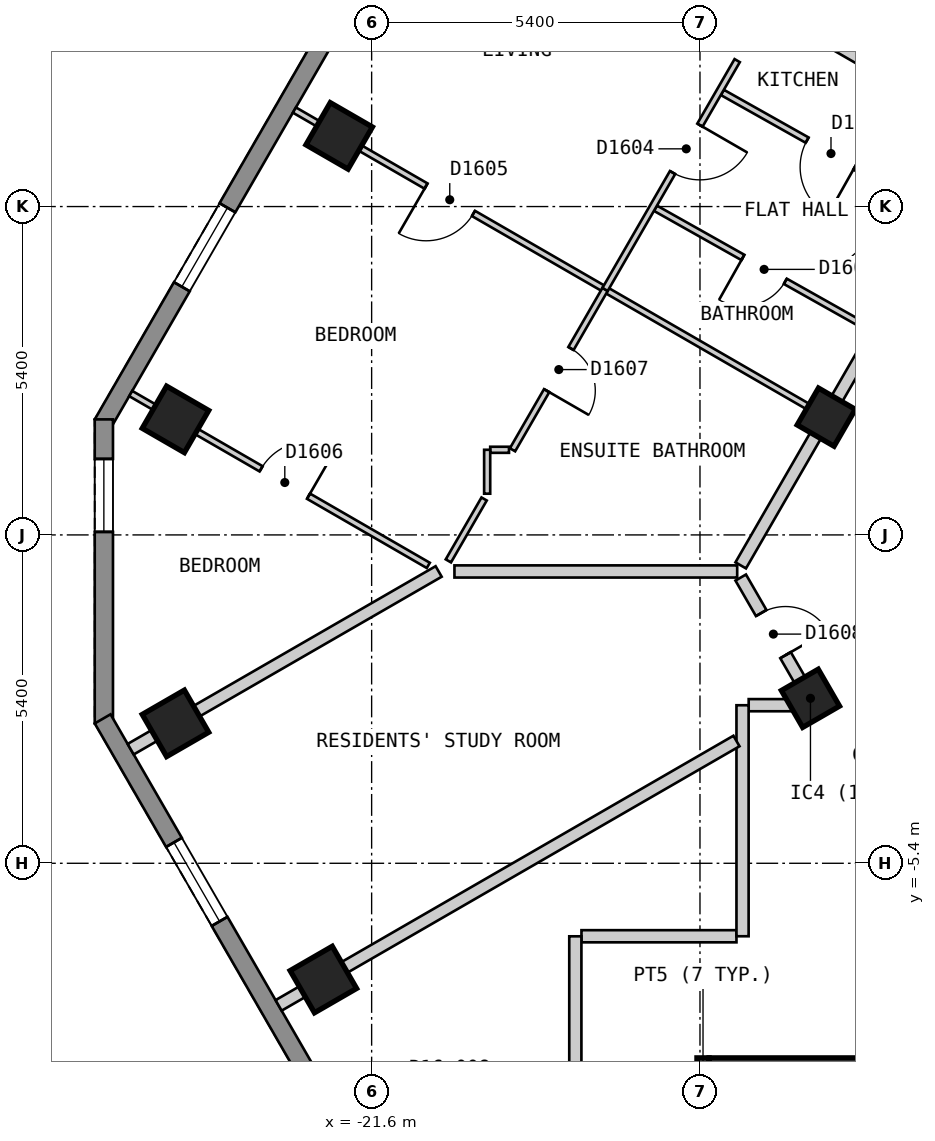
"""IFC4 building model, lengths in metres.
Left out: names, types, materials, properties, quantities, classifications, styles, units other than length and angle.
Written with IfcOpenShell. Run it as: python <this file> out.ifc"""

import sys

from ifc_helpers import new_model, si_unit, direction, frame, frame_2d, origin, origin_2d, place, context, subcontext, project, spatial, polyline, rectangle, outline, extrude, element, fill, save


model = new_model("IFC4")
c1 = context("Model", 3, precision=1e-05, world=origin(), true_north=direction((0.0, 1.0)))
c2 = subcontext(c1, "Body", "Model", "MODEL_VIEW")
j1 = project(units=[si_unit("LENGTHUNIT", "METRE"), si_unit("PLANEANGLEUNIT", "RADIAN")], contexts=[c1])
p1 = place(None, origin())
s1 = spatial("IfcSite", under=j1, at=p1, CompositionType="ELEMENT")
p2 = place(p1, origin())
s2 = spatial("IfcBuilding", under=s1, at=p2, CompositionType="ELEMENT")
p3 = place(p2, frame((0.0, 0.0, 163.2)))
s3 = spatial("IfcBuildingStorey", under=s2, at=p3, CompositionType="ELEMENT", Elevation=163.2)
for number, where, z_axis, x_axis in (
    (1, (-22.134, 6.562, 0.0), (0.0, 0.0, 1.0), (-0.5, -0.866, 0.0)),
    (2, (-24.826, 1.9, 0.0), (0.0, 0.0, 1.0), (-0.5, -0.866, 0.0)),
    (3, (-24.826, -3.099, 0.0), (0.0, 0.0, 1.0), (0.5, -0.866, 0.0)),
    (4, (-22.394, -7.312, 0.0), (0.0, 0.0, 1.0), (0.5, -0.866, 0.0)),
):
    element("IfcColumn", number, at=place(p3, frame(where, z_axis=z_axis, x_axis=x_axis)), inside=s3, PredefinedType="COLUMN", context=c2, shape_type="SweptSolid", body=[
        extrude(rectangle(XDim=0.8, YDim=0.8, at=origin_2d()), origin(), (0.0, 0.0, 1.0), 3.0),
    ])
for number, where, z_axis, x_axis in (
    (5, (-14.383, -2.687, 0.0), (0.0, 0.0, 1.0), (0.5, -0.866, 0.0)),
    (6, (-14.123, 1.937, 0.0), (0.0, 0.0, 1.0), (-0.5, -0.866, 0.0)),
):
    element("IfcColumn", number, at=place(p3, frame(where, z_axis=z_axis, x_axis=x_axis)), inside=s3, PredefinedType="COLUMN", context=c2, shape_type="SweptSolid", body=[
        extrude(rectangle(XDim=0.7, YDim=0.7, at=origin_2d()), origin(), (0.0, 0.0, 1.0), 3.0),
    ])
p4 = place(p3, frame((-14.592, 21.625, 0.0), z_axis=(0.0, 0.0, 1.0), x_axis=(-0.500010537973, -0.866019319597, 0.0)))
e7 = element("IfcWall", 7, at=p4, inside=s3, PredefinedType="SOLIDWALL", context=c2, shape_type="SweptSolid", body=[
    extrude(outline(polyline([(0.0, -0.15), (22.863, -0.15), (22.783, 0.15), (0.08, 0.15), (0.0, -0.15)])), origin(), (0.0, 0.0, 1.0), 2.7),
])
p5 = place(p4, frame((2.606, 0.0, 0.15)))
e8 = element("IfcOpeningElement", 8, at=p5, cuts=e7, PredefinedType="OPENING", context=c2, shape_type="SweptSolid", body=[
    extrude(rectangle(XDim=1.5, YDim=2.1, at=frame_2d((0.75, 1.05))), frame((0.0, 0.16, 0.0), z_axis=(0.0, -1.0, 0.0), x_axis=(1.0, 0.0, 0.0)), (0.0, 0.0, 1.0), 0.32),
])
p6 = place(p4, frame((7.99, 0.0, 0.15)))
e9 = element("IfcOpeningElement", 9, at=p6, cuts=e7, PredefinedType="OPENING", context=c2, shape_type="SweptSolid", body=[
    extrude(rectangle(XDim=1.5, YDim=2.1, at=frame_2d((0.75, 1.05))), frame((0.0, 0.16, 0.0), z_axis=(0.0, -1.0, 0.0), x_axis=(1.0, 0.0, 0.0)), (0.0, 0.0, 1.0), 0.32),
])
p7 = place(p4, frame((13.373, 0.0, 0.15)))
e10 = element("IfcOpeningElement", 10, at=p7, cuts=e7, PredefinedType="OPENING", context=c2, shape_type="SweptSolid", body=[
    extrude(rectangle(XDim=1.5, YDim=2.1, at=frame_2d((0.75, 1.05))), frame((0.0, 0.16, 0.0), z_axis=(0.0, -1.0, 0.0), x_axis=(1.0, 0.0, 0.0)), (0.0, 0.0, 1.0), 0.32),
])
p8 = place(p4, frame((18.758, 0.0, 0.15)))
e11 = element("IfcOpeningElement", 11, at=p8, cuts=e7, PredefinedType="OPENING", context=c2, shape_type="SweptSolid", body=[
    extrude(rectangle(XDim=1.5, YDim=2.1, at=frame_2d((0.75, 1.05))), frame((0.0, 0.16, 0.0), z_axis=(0.0, -1.0, 0.0), x_axis=(1.0, 0.0, 0.0)), (0.0, 0.0, 1.0), 0.32),
])
p9 = place(p3, frame((-26.004, 1.9, 0.0), z_axis=(0.0, 0.0, 1.0), x_axis=(0.0, -1.0, 0.0)))
e12 = element("IfcWall", 12, at=p9, inside=s3, PredefinedType="SOLIDWALL", context=c2, shape_type="SweptSolid", body=[
    extrude(outline(polyline([(0.0, -0.15), (5.0, -0.15), (4.92, 0.15), (0.08, 0.15), (0.0, -0.15)])), origin(), (0.0, 0.0, 1.0), 2.7),
])
p10 = place(p9, frame((0.65, 0.0, 0.15)))
e13 = element("IfcOpeningElement", 13, at=p10, cuts=e12, PredefinedType="OPENING", context=c2, shape_type="SweptSolid", body=[
    extrude(rectangle(XDim=1.2, YDim=2.1, at=frame_2d((0.6, 1.05))), frame((0.0, 0.16, 0.0), z_axis=(0.0, -1.0, 0.0), x_axis=(1.0, 0.0, 0.0)), (0.0, 0.0, 1.0), 0.32),
])
p11 = place(p3, frame((-26.024, -3.025, 0.0), z_axis=(0.0, 0.0, 1.0), x_axis=(0.500018670445, -0.86601462413, 0.0)))
e14 = element("IfcWall", 14, at=p11, inside=s3, PredefinedType="SOLIDWALL", context=c2, shape_type="SweptSolid", body=[
    extrude(outline(polyline([(0.0, -0.15), (20.785, -0.15), (20.705, 0.15), (0.08, 0.15), (0.0, -0.15)])), origin(), (0.0, 0.0, 1.0), 2.7),
])
p12 = place(p11, frame((2.346, 0.0, 0.15)))
e15 = element("IfcOpeningElement", 15, at=p12, cuts=e14, PredefinedType="OPENING", context=c2, shape_type="SweptSolid", body=[
    extrude(rectangle(XDim=1.5, YDim=2.1, at=frame_2d((0.75, 1.05))), frame((0.0, 0.16, 0.0), z_axis=(0.0, -1.0, 0.0), x_axis=(1.0, 0.0, 0.0)), (0.0, 0.0, 1.0), 0.32),
])
p13 = place(p11, frame((7.21, 0.0, 0.15)))
e16 = element("IfcOpeningElement", 16, at=p13, cuts=e14, PredefinedType="OPENING", context=c2, shape_type="SweptSolid", body=[
    extrude(rectangle(XDim=1.5, YDim=2.1, at=frame_2d((0.75, 1.05))), frame((0.0, 0.16, 0.0), z_axis=(0.0, -1.0, 0.0), x_axis=(1.0, 0.0, 0.0)), (0.0, 0.0, 1.0), 0.32),
])
p14 = place(p11, frame((12.073, 0.0, 0.15)))
e17 = element("IfcOpeningElement", 17, at=p14, cuts=e14, PredefinedType="OPENING", context=c2, shape_type="SweptSolid", body=[
    extrude(rectangle(XDim=1.5, YDim=2.1, at=frame_2d((0.75, 1.05))), frame((0.0, 0.16, 0.0), z_axis=(0.0, -1.0, 0.0), x_axis=(1.0, 0.0, 0.0)), (0.0, 0.0, 1.0), 0.32),
])
p15 = place(p11, frame((16.938, 0.0, 0.15)))
e18 = element("IfcOpeningElement", 18, at=p15, cuts=e14, PredefinedType="OPENING", context=c2, shape_type="SweptSolid", body=[
    extrude(rectangle(XDim=1.5, YDim=2.1, at=frame_2d((0.75, 1.05))), frame((0.0, 0.16, 0.0), z_axis=(0.0, -1.0, 0.0), x_axis=(1.0, 0.0, 0.0)), (0.0, 0.0, 1.0), 0.32),
])
p16 = place(p3, frame((-15.53, -0.701, 0.0), z_axis=(0.0, 0.0, 1.0), x_axis=(0.499972710878, -0.866041158593, 0.0)))
e19 = element("IfcWall", 19, at=p16, inside=s3, PredefinedType="PARTITIONING", context=c2, shape_type="SweptSolid", body=[
    extrude(rectangle(XDim=2.308, YDim=0.2, at=frame_2d((1.154, 0.0))), origin(), (0.0, 0.0, 1.0), 2.7),
])
p17 = place(p16, frame((0.674, 0.0, 0.0)))
e20 = element("IfcOpeningElement", 20, at=p17, cuts=e19, PredefinedType="OPENING", context=c2, shape_type="SweptSolid", body=[
    extrude(rectangle(XDim=0.8, YDim=2.1, at=frame_2d((0.4, 1.05))), frame((0.0, 0.11, 0.0), z_axis=(0.0, -1.0, 0.0), x_axis=(1.0, 0.0, 0.0)), (0.0, 0.0, 1.0), 0.22),
])
p18 = place(p3, frame((-18.149, -6.6, 0.0), z_axis=(0.0, 0.0, 1.0), x_axis=(1.0, 0.0, 0.0)))
e21 = element("IfcWall", 21, at=p18, inside=s3, PredefinedType="PARTITIONING", context=c2, shape_type="SweptSolid", body=[
    extrude(rectangle(XDim=2.549, YDim=0.2, at=frame_2d((1.274, 0.0))), origin(), (0.0, 0.0, 1.0), 2.7),
])
p19 = place(p3, frame((-15.399, -2.8, 0.0), z_axis=(0.0, 0.0, 1.0), x_axis=(1.0, 0.0, 0.0)))
e22 = element("IfcWall", 22, at=p19, inside=s3, PredefinedType="PARTITIONING", context=c2, shape_type="SweptSolid", body=[
    extrude(rectangle(XDim=1.081, YDim=0.2, at=frame_2d((0.541, 0.0))), origin(), (0.0, 0.0, 1.0), 2.7),
])
p20 = place(p3, frame((-15.53, -0.501, 0.0), z_axis=(0.0, 0.0, 1.0), x_axis=(0.499952498232, 0.866052827206, 0.0)))
e23 = element("IfcWall", 23, at=p20, inside=s3, PredefinedType="PARTITIONING", context=c2, shape_type="SweptSolid", body=[
    extrude(rectangle(XDim=9.585, YDim=0.2, at=frame_2d((4.792, 0.0))), origin(), (0.0, 0.0, 1.0), 2.7),
])
p21 = place(p20, frame((5.031, 0.0, 0.0)))
e24 = element("IfcOpeningElement", 24, at=p21, cuts=e23, PredefinedType="OPENING", context=c2, shape_type="SweptSolid", body=[
    extrude(rectangle(XDim=1.0, YDim=2.1, at=frame_2d((0.5, 1.05))), frame((0.0, 0.11, 0.0), z_axis=(0.0, -1.0, 0.0), x_axis=(1.0, 0.0, 0.0)), (0.0, 0.0, 1.0), 0.22),
])
p22 = place(p3, frame((-15.5, -6.6, 0.0), z_axis=(0.0, 0.0, 1.0), x_axis=(0.0, 1.0, 0.0)))
e25 = element("IfcWall", 25, at=p22, inside=s3, PredefinedType="PARTITIONING", context=c2, shape_type="SweptSolid", body=[
    extrude(rectangle(XDim=3.799, YDim=0.2, at=frame_2d((1.899, 0.0))), origin(), (0.0, 0.0, 1.0), 2.7),
])
p23 = place(p3, frame((-18.25, -16.152, 0.0), z_axis=(0.0, 0.0, 1.0), x_axis=(0.0, 1.0, 0.0)))
e26 = element("IfcWall", 26, at=p23, inside=s3, PredefinedType="PARTITIONING", context=c2, shape_type="SweptSolid", body=[
    extrude(rectangle(XDim=9.551, YDim=0.2, at=frame_2d((4.775, 0.0))), origin(), (0.0, 0.0, 1.0), 2.7),
])
p24 = place(p23, frame((6.026, 0.0, 0.0)))
e27 = element("IfcOpeningElement", 27, at=p24, cuts=e26, PredefinedType="OPENING", context=c2, shape_type="SweptSolid", body=[
    extrude(rectangle(XDim=0.8, YDim=2.1, at=frame_2d((0.4, 1.05))), frame((0.0, 0.11, 0.0), z_axis=(0.0, -1.0, 0.0), x_axis=(1.0, 0.0, 0.0)), (0.0, 0.0, 1.0), 0.22),
])
p25 = place(p3, frame((-16.932, 5.372, 0.0), z_axis=(0.0, 0.0, 1.0), x_axis=(0.871514356952, -0.490369988505, 0.0)))
e28 = element("IfcWall", 28, at=p25, inside=s3, PredefinedType="PARTITIONING", context=c2, shape_type="SweptSolid", body=[
    extrude(rectangle(XDim=4.05, YDim=0.1, at=frame_2d((2.025, 0.0))), origin(), (0.0, 0.0, 1.0), 2.7),
])
p26 = place(p25, frame((1.65, 0.0, 0.0)))
e29 = element("IfcOpeningElement", 29, at=p26, cuts=e28, PredefinedType="OPENING", context=c2, shape_type="SweptSolid", body=[
    extrude(rectangle(XDim=0.8, YDim=2.1, at=frame_2d((0.4, 1.05))), frame((0.0, 0.06, 0.0), z_axis=(0.0, -1.0, 0.0), x_axis=(1.0, 0.0, 0.0)), (0.0, 0.0, 1.0), 0.12),
])
p27 = place(p3, frame((-15.832, 7.277, 0.0), z_axis=(0.0, 0.0, 1.0), x_axis=(0.871528850672, -0.490344228523, 0.0)))
e30 = element("IfcWall", 30, at=p27, inside=s3, PredefinedType="PARTITIONING", context=c2, shape_type="SweptSolid", body=[
    extrude(rectangle(XDim=4.05, YDim=0.1, at=frame_2d((2.025, 0.0))), origin(), (0.0, 0.0, 1.0), 2.7),
])
p28 = place(p27, frame((1.6, 0.0, 0.0)))
e31 = element("IfcOpeningElement", 31, at=p28, cuts=e30, PredefinedType="OPENING", context=c2, shape_type="SweptSolid", body=[
    extrude(rectangle(XDim=0.9, YDim=2.1, at=frame_2d((0.45, 1.05))), frame((0.0, 0.06, 0.0), z_axis=(0.0, -1.0, 0.0), x_axis=(1.0, 0.0, 0.0)), (0.0, 0.0, 1.0), 0.12),
])
p29 = place(p3, frame((-22.87, 6.987, 0.0), z_axis=(0.0, 0.0, 1.0), x_axis=(0.866022959057, -0.500004234368, 0.0)))
e32 = element("IfcWall", 32, at=p29, inside=s3, PredefinedType="PARTITIONING", context=c2, shape_type="SweptSolid", body=[
    extrude(rectangle(XDim=10.0, YDim=0.1, at=frame_2d((5.0, 0.0))), origin(), (0.0, 0.0, 1.0), 2.7),
])
p30 = place(p29, frame((2.5, 0.0, 0.0)))
e33 = element("IfcOpeningElement", 33, at=p30, cuts=e32, PredefinedType="OPENING", context=c2, shape_type="SweptSolid", body=[
    extrude(rectangle(XDim=0.9, YDim=2.1, at=frame_2d((0.45, 1.05))), frame((0.0, 0.06, 0.0), z_axis=(0.0, -1.0, 0.0), x_axis=(1.0, 0.0, 0.0)), (0.0, 0.0, 1.0), 0.12),
])
p31 = place(p3, frame((-25.562, 2.325, 0.0), z_axis=(0.0, 0.0, 1.0), x_axis=(0.865998530728, -0.500046542611, 0.0)))
e34 = element("IfcWall", 34, at=p31, inside=s3, PredefinedType="PARTITIONING", context=c2, shape_type="SweptSolid", body=[
    extrude(rectangle(XDim=5.651, YDim=0.1, at=frame_2d((2.826, 0.0))), origin(), (0.0, 0.0, 1.0), 2.7),
])
p32 = place(p31, frame((2.476, 0.0, 0.0)))
e35 = element("IfcOpeningElement", 35, at=p32, cuts=e34, PredefinedType="OPENING", context=c2, shape_type="SweptSolid", body=[
    extrude(rectangle(XDim=0.9, YDim=2.1, at=frame_2d((0.45, 1.05))), frame((0.0, 0.06, 0.0), z_axis=(0.0, -1.0, 0.0), x_axis=(1.0, 0.0, 0.0)), (0.0, 0.0, 1.0), 0.12),
])
p33 = place(p3, frame((-19.65, 1.4, 0.0), z_axis=(0.0, 0.0, 1.0), x_axis=(1.0, 0.0, 0.0)))
e36 = element("IfcWall", 36, at=p33, inside=s3, PredefinedType="PARTITIONING", context=c2, shape_type="SweptSolid", body=[
    extrude(rectangle(XDim=0.309, YDim=0.1, at=frame_2d((0.154, 0.0))), origin(), (0.0, 0.0, 1.0), 2.7),
])
p34 = place(p3, frame((-20.338, -0.427, 0.0), z_axis=(0.0, 0.0, 1.0), x_axis=(0.500069990121, 0.865984991198, 0.0)))
e37 = element("IfcWall", 37, at=p34, inside=s3, PredefinedType="PARTITIONING", context=c2, shape_type="SweptSolid", body=[
    extrude(rectangle(XDim=1.176, YDim=0.1, at=frame_2d((0.588, 0.0))), origin(), (0.0, 0.0, 1.0), 2.7),
])
p35 = place(p3, frame((-19.283, 1.4, 0.0), z_axis=(0.0, 0.0, 1.0), x_axis=(0.499847391584, 0.866113494368, 0.0)))
e38 = element("IfcWall", 38, at=p35, inside=s3, PredefinedType="PARTITIONING", context=c2, shape_type="SweptSolid", body=[
    extrude(rectangle(XDim=3.045, YDim=0.1, at=frame_2d((1.522, 0.0))), origin(), (0.0, 0.0, 1.0), 2.7),
])
p36 = place(p35, frame((1.123, 0.0, 0.0)))
e39 = element("IfcOpeningElement", 39, at=p36, cuts=e38, PredefinedType="OPENING", context=c2, shape_type="SweptSolid", body=[
    extrude(rectangle(XDim=0.8, YDim=2.1, at=frame_2d((0.4, 1.05))), frame((0.0, 0.06, 0.0), z_axis=(0.0, -1.0, 0.0), x_axis=(1.0, 0.0, 0.0)), (0.0, 0.0, 1.0), 0.12),
])
p37 = place(p3, frame((-19.7, 0.678, 0.0), z_axis=(0.0, 0.0, 1.0), x_axis=(0.0, 1.0, 0.0)))
e40 = element("IfcWall", 40, at=p37, inside=s3, PredefinedType="PARTITIONING", context=c2, shape_type="SweptSolid", body=[
    extrude(rectangle(XDim=0.722, YDim=0.1, at=frame_2d((0.361, 0.0))), origin(), (0.0, 0.0, 1.0), 2.7),
])
p38 = place(p3, frame((-20.178, 11.65, 0.0), z_axis=(0.0, 0.0, 1.0), x_axis=(0.866016855193, -0.500014806302, 0.0)))
e41 = element("IfcWall", 41, at=p38, inside=s3, PredefinedType="PARTITIONING", context=c2, shape_type="SweptSolid", body=[
    extrude(rectangle(XDim=10.0, YDim=0.2, at=frame_2d((5.0, 0.0))), origin(), (0.0, 0.0, 1.0), 2.7),
])
p39 = place(p3, frame((-20.238, -0.601, 0.0), z_axis=(0.0, 0.0, 1.0), x_axis=(1.0, 0.0, 0.0)))
e42 = element("IfcWall", 42, at=p39, inside=s3, PredefinedType="PARTITIONING", context=c2, shape_type="SweptSolid", body=[
    extrude(rectangle(XDim=4.65, YDim=0.2, at=frame_2d((2.325, 0.0))), origin(), (0.0, 0.0, 1.0), 2.7),
])
p40 = place(p3, frame((-23.13, -7.737, 0.0), z_axis=(0.0, 0.0, 1.0), x_axis=(0.86598451299, 0.500070818246, 0.0)))
e43 = element("IfcWall", 43, at=p40, inside=s3, PredefinedType="PARTITIONING", context=c2, shape_type="SweptSolid", body=[
    extrude(rectangle(XDim=8.695, YDim=0.2, at=frame_2d((4.348, 0.0))), origin(), (0.0, 0.0, 1.0), 2.7),
])
p41 = place(p3, frame((-25.563, -3.524, 0.0), z_axis=(0.0, 0.0, 1.0), x_axis=(0.866128586522, 0.499821239653, 0.0)))
e44 = element("IfcWall", 44, at=p41, inside=s3, PredefinedType="PARTITIONING", context=c2, shape_type="SweptSolid", body=[
    extrude(rectangle(XDim=5.848, YDim=0.2, at=frame_2d((2.924, 0.0))), origin(), (0.0, 0.0, 1.0), 2.7),
])
p42 = place(p3, frame((-17.761, 4.037, 0.0), z_axis=(0.0, 0.0, 1.0), x_axis=(0.50009692756, 0.865969435399, 0.0)))
e45 = element("IfcWall", 45, at=p42, inside=s3, PredefinedType="PARTITIONING", context=c2, shape_type="SweptSolid", body=[
    extrude(rectangle(XDim=4.345, YDim=0.1, at=frame_2d((2.173, 0.0))), origin(), (0.0, 0.0, 1.0), 2.7),
])
p43 = place(p42, frame((2.22, 0.0, 0.0)))
e46 = element("IfcOpeningElement", 46, at=p43, cuts=e45, PredefinedType="OPENING", context=c2, shape_type="SweptSolid", body=[
    extrude(rectangle(XDim=0.9, YDim=2.1, at=frame_2d((0.45, 1.05))), frame((0.0, 0.06, 0.0), z_axis=(0.0, -1.0, 0.0), x_axis=(1.0, 0.0, 0.0)), (0.0, 0.0, 1.0), 0.12),
])
p44 = place(p3, frame((-16.15, -14.4, 0.0), z_axis=(0.0, 0.0, 1.0), x_axis=(0.0, 1.0, 0.0)))
e47 = element("IfcWall", 47, at=p44, inside=s3, PredefinedType="SOLIDWALL", context=c2, shape_type="SweptSolid", body=[
    extrude(rectangle(XDim=5.8, YDim=0.2, at=frame_2d((2.9, 0.0))), origin(), (0.0, 0.0, 1.0), 2.7),
])
p45 = place(p3, frame((-16.05, -8.7, 0.0), z_axis=(0.0, 0.0, 1.0), x_axis=(1.0, 0.0, 0.0)))
e48 = element("IfcWall", 48, at=p45, inside=s3, PredefinedType="SOLIDWALL", context=c2, shape_type="SweptSolid", body=[
    extrude(rectangle(XDim=2.75, YDim=0.2, at=frame_2d((1.375, 0.0))), origin(), (0.0, 0.0, 1.0), 2.7),
])
p46 = place(p8, origin())
e49 = element("IfcWindow", 49, at=p46, inside=s3, PartitioningType="SINGLE_PANEL", PredefinedType="WINDOW", context=c2, shape_type="SweptSolid", body=[
    extrude(rectangle(XDim=1.5, YDim=2.1, at=frame_2d((0.75, 1.05))), frame((0.0, 0.03, 0.0), z_axis=(0.0, -1.0, 0.0), x_axis=(1.0, 0.0, 0.0)), (0.0, 0.0, 1.0), 0.06),
])
fill(e11, e49)
p47 = place(p10, origin())
e50 = element("IfcWindow", 50, at=p47, inside=s3, PartitioningType="SINGLE_PANEL", PredefinedType="WINDOW", context=c2, shape_type="SweptSolid", body=[
    extrude(rectangle(XDim=1.2, YDim=2.1, at=frame_2d((0.6, 1.05))), frame((0.0, 0.03, 0.0), z_axis=(0.0, -1.0, 0.0), x_axis=(1.0, 0.0, 0.0)), (0.0, 0.0, 1.0), 0.06),
])
fill(e13, e50)
p48 = place(p12, origin())
e51 = element("IfcWindow", 51, at=p48, inside=s3, PartitioningType="SINGLE_PANEL", PredefinedType="WINDOW", context=c2, shape_type="SweptSolid", body=[
    extrude(rectangle(XDim=1.5, YDim=2.1, at=frame_2d((0.75, 1.05))), frame((0.0, 0.03, 0.0), z_axis=(0.0, -1.0, 0.0), x_axis=(1.0, 0.0, 0.0)), (0.0, 0.0, 1.0), 0.06),
])
fill(e15, e51)
p49 = place(p28, origin())
e52 = element("IfcDoor", 52, at=p49, inside=s3, OperationType="SINGLE_SWING_RIGHT", PredefinedType="DOOR", context=c2, shape_type="SweptSolid", body=[
    extrude(rectangle(XDim=0.9, YDim=2.1, at=frame_2d((0.45, 1.05))), frame((0.0, 0.025, 0.0), z_axis=(0.0, -1.0, 0.0), x_axis=(1.0, 0.0, 0.0)), (0.0, 0.0, 1.0), 0.05),
])
fill(e31, e52)
p50 = place(p26, origin())
e53 = element("IfcDoor", 53, at=p50, inside=s3, OperationType="SINGLE_SWING_LEFT", PredefinedType="DOOR", context=c2, shape_type="SweptSolid", body=[
    extrude(rectangle(XDim=0.8, YDim=2.1, at=frame_2d((0.4, 1.05))), frame((0.0, 0.025, 0.0), z_axis=(0.0, -1.0, 0.0), x_axis=(1.0, 0.0, 0.0)), (0.0, 0.0, 1.0), 0.05),
])
fill(e29, e53)
p51 = place(p43, origin())
e54 = element("IfcDoor", 54, at=p51, inside=s3, OperationType="SINGLE_SWING_RIGHT", PredefinedType="DOOR", context=c2, shape_type="SweptSolid", body=[
    extrude(rectangle(XDim=0.9, YDim=2.1, at=frame_2d((0.45, 1.05))), frame((0.0, 0.025, 0.0), z_axis=(0.0, -1.0, 0.0), x_axis=(1.0, 0.0, 0.0)), (0.0, 0.0, 1.0), 0.05),
])
fill(e46, e54)
p52 = place(p30, origin())
e55 = element("IfcDoor", 55, at=p52, inside=s3, OperationType="SINGLE_SWING_LEFT", PredefinedType="DOOR", context=c2, shape_type="SweptSolid", body=[
    extrude(rectangle(XDim=0.9, YDim=2.1, at=frame_2d((0.45, 1.05))), frame((0.0, 0.025, 0.0), z_axis=(0.0, -1.0, 0.0), x_axis=(1.0, 0.0, 0.0)), (0.0, 0.0, 1.0), 0.05),
])
fill(e33, e55)
p53 = place(p32, origin())
e56 = element("IfcDoor", 56, at=p53, inside=s3, OperationType="SINGLE_SWING_RIGHT", PredefinedType="DOOR", context=c2, shape_type="SweptSolid", body=[
    extrude(rectangle(XDim=0.9, YDim=2.1, at=frame_2d((0.45, 1.05))), frame((0.0, 0.025, 0.0), z_axis=(0.0, -1.0, 0.0), x_axis=(1.0, 0.0, 0.0)), (0.0, 0.0, 1.0), 0.05),
])
fill(e35, e56)
p54 = place(p36, origin())
e57 = element("IfcDoor", 57, at=p54, inside=s3, OperationType="SINGLE_SWING_LEFT", PredefinedType="DOOR", context=c2, shape_type="SweptSolid", body=[
    extrude(rectangle(XDim=0.8, YDim=2.1, at=frame_2d((0.4, 1.05))), frame((0.0, 0.025, 0.0), z_axis=(0.0, -1.0, 0.0), x_axis=(1.0, 0.0, 0.0)), (0.0, 0.0, 1.0), 0.05),
])
fill(e39, e57)
p55 = place(p17, origin())
e58 = element("IfcDoor", 58, at=p55, inside=s3, OperationType="SINGLE_SWING_RIGHT", PredefinedType="DOOR", context=c2, shape_type="SweptSolid", body=[
    extrude(rectangle(XDim=0.8, YDim=2.1, at=frame_2d((0.4, 1.05))), frame((0.0, 0.025, 0.0), z_axis=(0.0, -1.0, 0.0), x_axis=(1.0, 0.0, 0.0)), (0.0, 0.0, 1.0), 0.05),
])
fill(e20, e58)
save(model, sys.argv[1])
